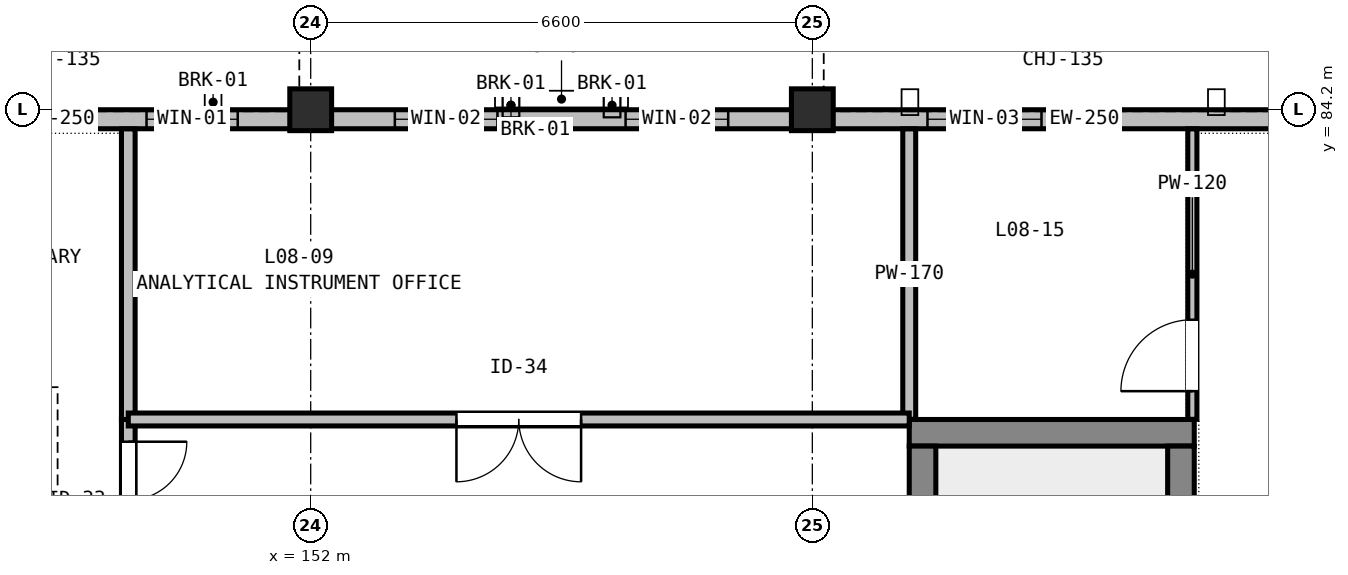
"""IFC4 building model, lengths in metres.
Left out: names, types, materials, properties, quantities, classifications, styles, units other than length and angle.
Written with IfcOpenShell. Run it as: python <this file> out.ifc"""

import sys

from ifc_helpers import new_model, si_unit, direction, frame, frame_2d, origin, origin_2d, place, context, subcontext, project, spatial, rectangle, extrude, element, fill, save


model = new_model("IFC4")
c1 = context("Model", 3, precision=1e-05, world=origin(), true_north=direction((0.0, 1.0)))
c2 = subcontext(c1, "Body", "Model", "MODEL_VIEW")
j1 = project(units=[si_unit("LENGTHUNIT", "METRE"), si_unit("PLANEANGLEUNIT", "RADIAN")], contexts=[c1])
p1 = place(None, origin())
s1 = spatial("IfcSite", under=j1, at=p1, CompositionType="ELEMENT")
p2 = place(p1, origin())
s2 = spatial("IfcBuilding", under=s1, at=p2, CompositionType="ELEMENT")
p3 = place(p2, frame((0.0, 0.0, 36.6)))
s3 = spatial("IfcBuildingStorey", under=s2, at=p3, CompositionType="ELEMENT", Elevation=36.6)
for number, where, z_axis, x_axis in (
    (1, (152.0, 84.2, 0.0), (0.0, 0.0, 1.0), (1.0, 0.0, 0.0)),
    (2, (158.6, 84.2, 0.0), (0.0, 0.0, 1.0), (1.0, 0.0, 0.0)),
):
    element("IfcColumn", number, at=place(p3, frame(where, z_axis=z_axis, x_axis=x_axis)), inside=s3, PredefinedType="COLUMN", context=c2, shape_type="SweptSolid", body=[
        extrude(rectangle(XDim=0.55, YDim=0.55, at=origin_2d()), origin(), (0.0, 0.0, 1.0), 3.9),
    ])
p4 = place(p3, frame((159.875, 79.95, 0.0), z_axis=(0.0, 0.0, 1.0), x_axis=(1.0, 0.0, 0.0)))
e3 = element("IfcWall", 3, at=p4, inside=s3, PredefinedType="SHEAR", context=c2, shape_type="SweptSolid", body=[
    extrude(rectangle(XDim=3.75, YDim=0.35, at=frame_2d((1.875, 0.0))), origin(), (0.0, 0.0, 1.0), 3.9),
])
for number, where, z_axis, x_axis in (
    (4, (160.05, 72.4, 0.0), (0.0, 0.0, 1.0), (0.0, 1.0, 0.0)),
    (5, (163.45, 72.4, 0.0), (0.0, 0.0, 1.0), (0.0, 1.0, 0.0)),
):
    element("IfcWall", number, at=place(p3, frame(where, z_axis=z_axis, x_axis=x_axis)), inside=s3, PredefinedType="SHEAR", context=c2, shape_type="SweptSolid", body=[
        extrude(rectangle(XDim=7.375, YDim=0.35, at=frame_2d((3.688, 0.0))), origin(), (0.0, 0.0, 1.0), 3.9),
    ])
p5 = place(p3, frame((145.4, 84.075, 0.0), z_axis=(0.0, 0.0, 1.0), x_axis=(1.0, 0.0, 0.0)))
e6 = element("IfcWall", 6, at=p5, inside=s3, PredefinedType="STANDARD", context=c2, shape_type="SweptSolid", body=[
    extrude(rectangle(XDim=6.6, YDim=0.25, at=frame_2d((3.3, 0.0))), origin(), (0.0, 0.0, 1.0), 3.185),
])
p6 = place(p5, frame((1.182, 0.0, 0.9)))
e7 = element("IfcOpeningElement", 7, at=p6, cuts=e6, PredefinedType="OPENING", context=c2, shape_type="SweptSolid", body=[
    extrude(rectangle(XDim=1.2, YDim=2.1, at=frame_2d((0.6, 1.05))), frame((0.0, 0.135, 0.0), z_axis=(0.0, -1.0, 0.0), x_axis=(1.0, 0.0, 0.0)), (0.0, 0.0, 1.0), 0.27),
])
p7 = place(p5, frame((4.44, 0.0, 0.9)))
e8 = element("IfcOpeningElement", 8, at=p7, cuts=e6, PredefinedType="OPENING", context=c2, shape_type="SweptSolid", body=[
    extrude(rectangle(XDim=1.2, YDim=2.1, at=frame_2d((0.6, 1.05))), frame((0.0, 0.135, 0.0), z_axis=(0.0, -1.0, 0.0), x_axis=(1.0, 0.0, 0.0)), (0.0, 0.0, 1.0), 0.27),
])
p8 = place(p3, frame((152.0, 84.075, 0.0), z_axis=(0.0, 0.0, 1.0), x_axis=(1.0, 0.0, 0.0)))
e9 = element("IfcWall", 9, at=p8, inside=s3, PredefinedType="STANDARD", context=c2, shape_type="SweptSolid", body=[
    extrude(rectangle(XDim=6.6, YDim=0.25, at=frame_2d((3.3, 0.0))), origin(), (0.0, 0.0, 1.0), 3.185),
])
p9 = place(p8, frame((1.107, 0.0, 0.9)))
e10 = element("IfcOpeningElement", 10, at=p9, cuts=e9, PredefinedType="OPENING", context=c2, shape_type="SweptSolid", body=[
    extrude(rectangle(XDim=1.35, YDim=2.1, at=frame_2d((0.675, 1.05))), frame((0.0, 0.135, 0.0), z_axis=(0.0, -1.0, 0.0), x_axis=(1.0, 0.0, 0.0)), (0.0, 0.0, 1.0), 0.27),
])
p10 = place(p8, frame((4.143, 0.0, 0.9)))
e11 = element("IfcOpeningElement", 11, at=p10, cuts=e9, PredefinedType="OPENING", context=c2, shape_type="SweptSolid", body=[
    extrude(rectangle(XDim=1.35, YDim=2.1, at=frame_2d((0.675, 1.05))), frame((0.0, 0.135, 0.0), z_axis=(0.0, -1.0, 0.0), x_axis=(1.0, 0.0, 0.0)), (0.0, 0.0, 1.0), 0.27),
])
p11 = place(p3, frame((158.6, 84.075, 0.0), z_axis=(0.0, 0.0, 1.0), x_axis=(1.0, 0.0, 0.0)))
e12 = element("IfcWall", 12, at=p11, inside=s3, PredefinedType="STANDARD", context=c2, shape_type="SweptSolid", body=[
    extrude(rectangle(XDim=6.6, YDim=0.25, at=frame_2d((3.3, 0.0))), origin(), (0.0, 0.0, 1.0), 3.185),
])
p12 = place(p11, frame((1.515, 0.0, 0.9)))
e13 = element("IfcOpeningElement", 13, at=p12, cuts=e12, PredefinedType="OPENING", context=c2, shape_type="SweptSolid", body=[
    extrude(rectangle(XDim=1.5, YDim=2.1, at=frame_2d((0.75, 1.05))), frame((0.0, 0.135, 0.0), z_axis=(0.0, -1.0, 0.0), x_axis=(1.0, 0.0, 0.0)), (0.0, 0.0, 1.0), 0.27),
])
p13 = place(p3, frame((149.6, 83.948, 0.0), z_axis=(0.0, 0.0, 1.0), x_axis=(0.0, -1.0, 0.0)))
e14 = element("IfcWall", 14, at=p13, inside=s3, PredefinedType="PARTITIONING", context=c2, shape_type="SweptSolid", body=[
    extrude(rectangle(XDim=3.823, YDim=0.18, at=frame_2d((1.912, 0.0))), origin(), (0.0, 0.0, 1.0), 3.335),
])
p14 = place(p3, frame((149.6, 80.125, 0.0), z_axis=(0.0, 0.0, 1.0), x_axis=(0.0, -1.0, 0.0)))
e15 = element("IfcWall", 15, at=p14, inside=s3, PredefinedType="PARTITIONING", context=c2, shape_type="SweptSolid", body=[
    extrude(rectangle(XDim=2.125, YDim=0.18, at=frame_2d((1.062, 0.0))), origin(), (0.0, 0.0, 1.0), 3.635),
])
p15 = place(p14, frame((0.292, 0.0, 0.0)))
e16 = element("IfcOpeningElement", 16, at=p15, cuts=e15, PredefinedType="OPENING", context=c2, shape_type="SweptSolid", body=[
    extrude(rectangle(XDim=1.54, YDim=2.2, at=frame_2d((0.77, 1.1))), frame((0.0, 0.1, 0.0), z_axis=(0.0, -1.0, 0.0), x_axis=(1.0, 0.0, 0.0)), (0.0, 0.0, 1.0), 0.2),
])
p16 = place(p3, frame((159.875, 83.948, 0.0), z_axis=(0.0, 0.0, 1.0), x_axis=(0.0, -1.0, 0.0)))
e17 = element("IfcWall", 17, at=p16, inside=s3, PredefinedType="PARTITIONING", context=c2, shape_type="SweptSolid", body=[
    extrude(rectangle(XDim=3.821, YDim=0.17, at=frame_2d((1.911, 0.0))), origin(), (0.0, 0.0, 1.0), 3.335),
])
p17 = place(p3, frame((159.875, 80.125, 0.0), z_axis=(0.0, 0.0, 1.0), x_axis=(-1.0, 0.0, 0.0)))
e18 = element("IfcWall", 18, at=p17, inside=s3, PredefinedType="PARTITIONING", context=c2, shape_type="SweptSolid", body=[
    extrude(rectangle(XDim=10.275, YDim=0.17, at=frame_2d((5.137, 0.0))), origin(), (0.0, 0.0, 1.0), 3.185),
])
p18 = place(p17, frame((4.317, 0.0, 0.0)))
e19 = element("IfcOpeningElement", 19, at=p18, cuts=e18, PredefinedType="OPENING", context=c2, shape_type="SweptSolid", body=[
    extrude(rectangle(XDim=1.64, YDim=2.2, at=frame_2d((0.82, 1.1))), frame((0.0, 0.095, 0.0), z_axis=(0.0, -1.0, 0.0), x_axis=(1.0, 0.0, 0.0)), (0.0, 0.0, 1.0), 0.19),
])
p19 = place(p3, frame((163.6, 80.127, 0.0), z_axis=(0.0, 0.0, 1.0), x_axis=(0.0, 1.0, 0.0)))
e20 = element("IfcWall", 20, at=p19, inside=s3, PredefinedType="PARTITIONING", context=c2, shape_type="SweptSolid", body=[
    extrude(rectangle(XDim=3.821, YDim=0.12, at=frame_2d((1.911, 0.0))), origin(), (0.0, 0.0, 1.0), 3.635),
])
p20 = place(p19, frame((0.371, 0.0, 0.0)))
e21 = element("IfcOpeningElement", 21, at=p20, cuts=e20, PredefinedType="OPENING", context=c2, shape_type="SweptSolid", body=[
    extrude(rectangle(XDim=0.94, YDim=2.02, at=frame_2d((0.47, 1.01))), frame((0.0, 0.07, 0.0), z_axis=(0.0, -1.0, 0.0), x_axis=(1.0, 0.0, 0.0)), (0.0, 0.0, 1.0), 0.14),
])
p21 = place(p7, origin())
e22 = element("IfcWindow", 22, at=p21, inside=s3, PartitioningType="SINGLE_PANEL", PredefinedType="WINDOW", context=c2, shape_type="SweptSolid", body=[
    extrude(rectangle(XDim=1.2, YDim=2.1, at=frame_2d((0.6, 1.05))), frame((0.0, 0.03, 0.0), z_axis=(0.0, -1.0, 0.0), x_axis=(1.0, 0.0, 0.0)), (0.0, 0.0, 1.0), 0.06),
])
fill(e8, e22)
p22 = place(p9, origin())
e23 = element("IfcWindow", 23, at=p22, inside=s3, PartitioningType="SINGLE_PANEL", PredefinedType="WINDOW", context=c2, shape_type="SweptSolid", body=[
    extrude(rectangle(XDim=1.35, YDim=2.1, at=frame_2d((0.675, 1.05))), frame((0.0, 0.03, 0.0), z_axis=(0.0, -1.0, 0.0), x_axis=(1.0, 0.0, 0.0)), (0.0, 0.0, 1.0), 0.06),
])
fill(e10, e23)
p23 = place(p10, origin())
e24 = element("IfcWindow", 24, at=p23, inside=s3, PartitioningType="SINGLE_PANEL", PredefinedType="WINDOW", context=c2, shape_type="SweptSolid", body=[
    extrude(rectangle(XDim=1.35, YDim=2.1, at=frame_2d((0.675, 1.05))), frame((0.0, 0.03, 0.0), z_axis=(0.0, -1.0, 0.0), x_axis=(1.0, 0.0, 0.0)), (0.0, 0.0, 1.0), 0.06),
])
fill(e11, e24)
p24 = place(p12, origin())
e25 = element("IfcWindow", 25, at=p24, inside=s3, PartitioningType="SINGLE_PANEL", PredefinedType="WINDOW", context=c2, shape_type="SweptSolid", body=[
    extrude(rectangle(XDim=1.5, YDim=2.1, at=frame_2d((0.75, 1.05))), frame((0.0, 0.03, 0.0), z_axis=(0.0, -1.0, 0.0), x_axis=(1.0, 0.0, 0.0)), (0.0, 0.0, 1.0), 0.06),
])
fill(e13, e25)
p25 = place(p15, origin())
e26 = element("IfcDoor", 26, at=p25, inside=s3, OperationType="DOUBLE_DOOR_SINGLE_SWING", PredefinedType="DOOR", context=c2, shape_type="SweptSolid", body=[
    extrude(rectangle(XDim=1.54, YDim=2.2, at=frame_2d((0.77, 1.1))), frame((0.0, 0.025, 0.0), z_axis=(0.0, -1.0, 0.0), x_axis=(1.0, 0.0, 0.0)), (0.0, 0.0, 1.0), 0.05),
])
fill(e16, e26)
p26 = place(p18, origin())
e27 = element("IfcDoor", 27, at=p26, inside=s3, OperationType="DOUBLE_DOOR_SINGLE_SWING", PredefinedType="DOOR", context=c2, shape_type="SweptSolid", body=[
    extrude(rectangle(XDim=1.64, YDim=2.2, at=frame_2d((0.82, 1.1))), frame((0.0, 0.025, 0.0), z_axis=(0.0, -1.0, 0.0), x_axis=(1.0, 0.0, 0.0)), (0.0, 0.0, 1.0), 0.05),
])
fill(e19, e27)
p27 = place(p20, origin())
e28 = element("IfcDoor", 28, at=p27, inside=s3, OperationType="SINGLE_SWING_LEFT", PredefinedType="DOOR", context=c2, shape_type="SweptSolid", body=[
    extrude(rectangle(XDim=0.94, YDim=2.02, at=frame_2d((0.47, 1.01))), frame((0.0, 0.025, 0.0), z_axis=(0.0, -1.0, 0.0), x_axis=(1.0, 0.0, 0.0)), (0.0, 0.0, 1.0), 0.05),
])
fill(e21, e28)
save(model, sys.argv[1])
